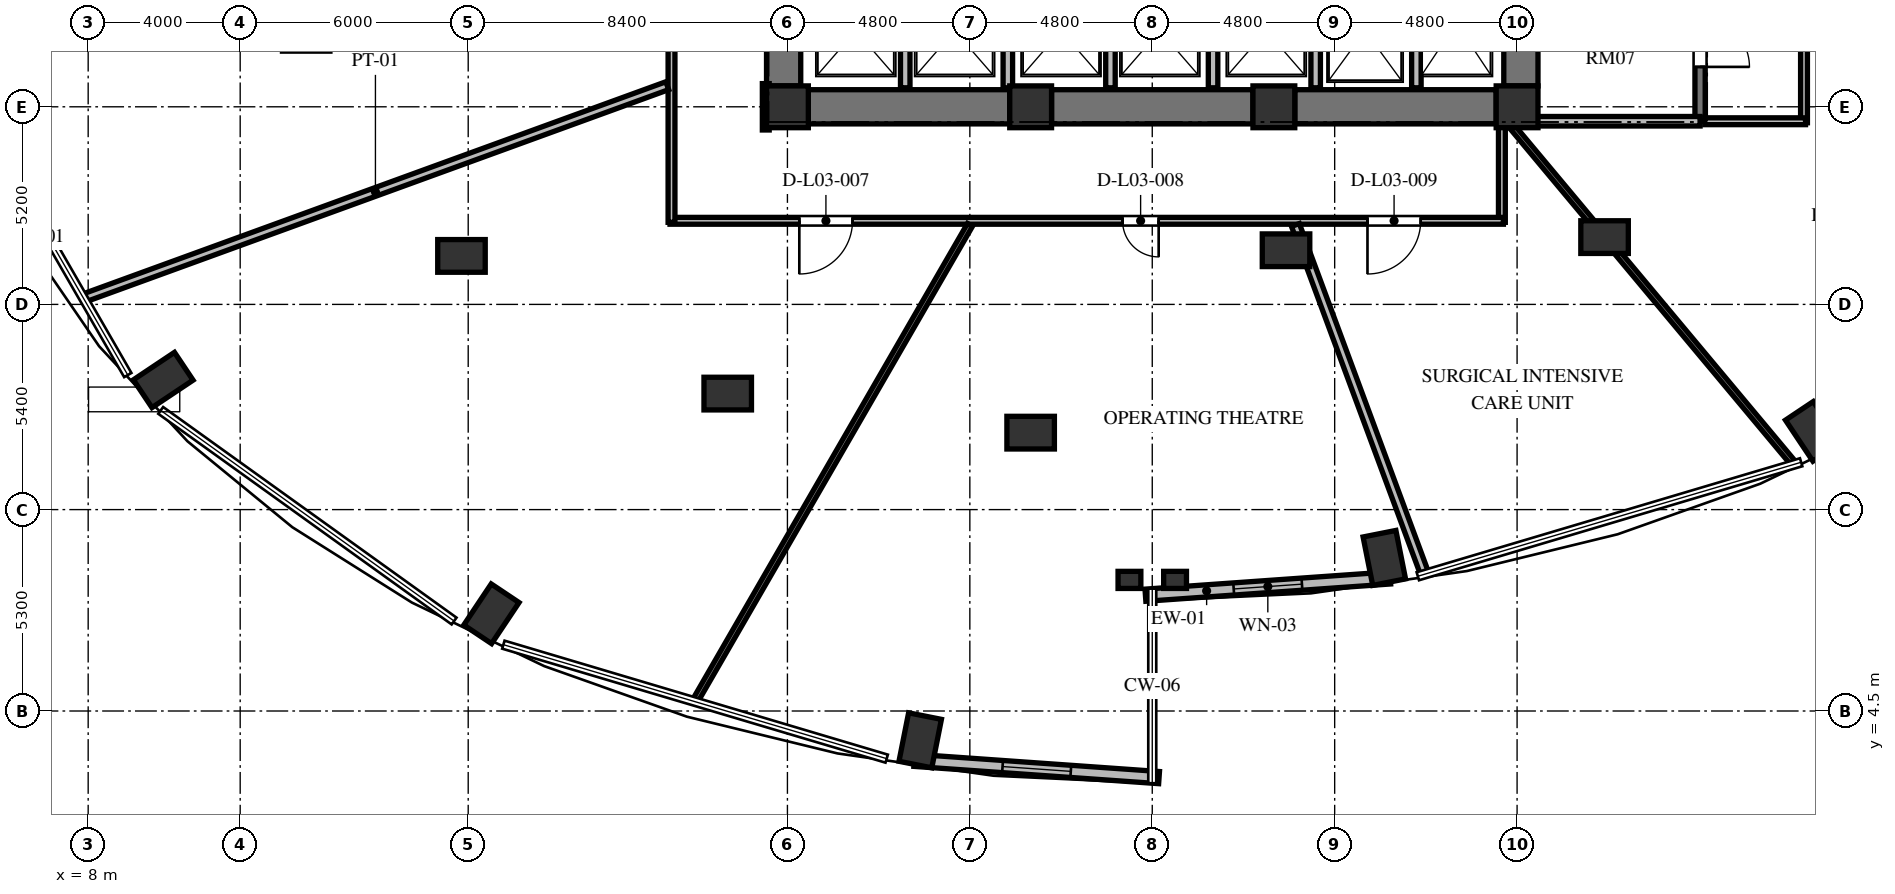
"""IFC4 building model, lengths in metres.
Left out: names, types, materials, properties, quantities, classifications, styles, units other than length and angle.
Written with IfcOpenShell. Run it as: python <this file> out.ifc"""

import sys

from ifc_helpers import new_model, si_unit, direction, frame, frame_2d, origin, origin_2d, place, context, subcontext, project, spatial, rectangle, extrude, element, fill, save


model = new_model("IFC4")
c1 = context("Model", 3, precision=1e-05, world=origin(), true_north=direction((0.0, 1.0)))
c2 = subcontext(c1, "Body", "Model", "MODEL_VIEW")
j1 = project(units=[si_unit("LENGTHUNIT", "METRE"), si_unit("PLANEANGLEUNIT", "RADIAN")], contexts=[c1])
p1 = place(None, origin())
s1 = spatial("IfcSite", under=j1, at=p1, CompositionType="ELEMENT")
p2 = place(p1, origin())
s2 = spatial("IfcBuilding", under=s1, at=p2, CompositionType="ELEMENT")
p3 = place(p2, frame((0.0, 0.0, 15.6)))
s3 = spatial("IfcBuildingStorey", under=s2, at=p3, CompositionType="ELEMENT", Elevation=15.6)
for number, where, z_axis, x_axis in (
    (1, (42.106, 8.529, 0.0), (0.0, 0.0, 1.0), (0.195, -0.981, 0.0)),
    (2, (53.389, 11.858, 0.0), (0.0, 0.0, 1.0), (0.556, -0.831, 0.0)),
    (3, (9.975, 13.211, 0.0), (0.0, 0.0, 1.0), (-0.831, -0.556, 0.0)),
    (4, (18.611, 7.058, 0.0), (0.0, 0.0, 1.0), (-0.556, -0.831, 0.0)),
    (5, (29.894, 3.729, 0.0), (0.0, 0.0, 1.0), (-0.195, -0.981, 0.0)),
):
    element("IfcColumn", number, at=place(p3, frame(where, z_axis=z_axis, x_axis=x_axis)), inside=s3, PredefinedType="COLUMN", context=c2, shape_type="SweptSolid", body=[
        extrude(rectangle(XDim=1.3, YDim=0.88, at=origin_2d()), origin(), (0.0, 0.0, 1.0), 4.8),
    ])
for number, where, z_axis, x_axis in (
    (6, (26.4, 20.4, 0.0), (0.0, 0.0, 1.0), (1.0, 0.0, 0.0)),
    (7, (32.8, 20.4, 0.0), (0.0, 0.0, 1.0), (1.0, 0.0, 0.0)),
    (8, (39.2, 20.4, 0.0), (0.0, 0.0, 1.0), (1.0, 0.0, 0.0)),
    (9, (45.6, 20.4, 0.0), (0.0, 0.0, 1.0), (1.0, 0.0, 0.0)),
):
    element("IfcColumn", number, at=place(p3, frame(where, z_axis=z_axis, x_axis=x_axis)), inside=s3, PredefinedType="COLUMN", context=c2, shape_type="SweptSolid", body=[
        extrude(rectangle(XDim=1.1, YDim=1.1, at=origin_2d()), origin(), (0.0, 0.0, 1.0), 4.8),
    ])
for number, where, z_axis, x_axis in (
    (10, (39.52, 16.625, 0.0), (0.0, 0.0, 1.0), (1.0, 0.0, 0.0)),
    (11, (47.902, 16.971, 0.0), (0.0, 0.0, 1.0), (1.0, 0.0, 0.0)),
    (12, (17.823, 16.476, 0.0), (0.0, 0.0, 1.0), (1.0, 0.0, 0.0)),
    (13, (24.829, 12.853, 0.0), (0.0, 0.0, 1.0), (1.0, 0.0, 0.0)),
    (14, (32.8, 11.825, 0.0), (0.0, 0.0, 1.0), (1.0, 0.0, 0.0)),
):
    element("IfcColumn", number, at=place(p3, frame(where, z_axis=z_axis, x_axis=x_axis)), inside=s3, PredefinedType="COLUMN", context=c2, shape_type="SweptSolid", body=[
        extrude(rectangle(XDim=1.25, YDim=0.86, at=origin_2d()), origin(), (0.0, 0.0, 1.0), 4.8),
    ])
for number, where, z_axis, x_axis in (
    (15, (35.4, 7.95, 0.0), (0.0, 0.0, 1.0), (1.0, 0.0, 0.0)),
    (16, (36.6, 7.95, 0.0), (0.0, 0.0, 1.0), (1.0, 0.0, 0.0)),
):
    element("IfcColumn", number, at=place(p3, frame(where, z_axis=z_axis, x_axis=x_axis)), inside=s3, PredefinedType="PILASTER", context=c2, shape_type="SweptSolid", body=[
        extrude(rectangle(XDim=0.6, YDim=0.45, at=origin_2d()), origin(), (0.0, 0.0, 1.0), 4.8),
    ])
p4 = place(p3, frame((26.3, 20.95, 0.0), z_axis=(0.0, 0.0, 1.0), x_axis=(0.0, 1.0, 0.0)))
e17 = element("IfcWall", 17, at=p4, inside=s3, PredefinedType="SHEAR", context=c2, shape_type="SweptSolid", body=[
    extrude(rectangle(XDim=14.1, YDim=0.9, at=frame_2d((7.05, 0.0))), origin(), (0.0, 0.0, 1.0), 4.8),
])
p5 = place(p4, frame((6.5, 0.0, 0.0)))
e18 = element("IfcOpeningElement", 18, at=p5, cuts=e17, PredefinedType="OPENING", context=c2, shape_type="SweptSolid", body=[
    extrude(rectangle(XDim=1.2, YDim=2.15, at=frame_2d((0.6, 1.075))), frame((0.0, 0.46, 0.0), z_axis=(0.0, -1.0, 0.0), x_axis=(1.0, 0.0, 0.0)), (0.0, 0.0, 1.0), 0.92),
])
p6 = place(p4, frame((9.6, 0.0, 0.0)))
e19 = element("IfcOpeningElement", 19, at=p6, cuts=e17, PredefinedType="OPENING", context=c2, shape_type="SweptSolid", body=[
    extrude(rectangle(XDim=1.3, YDim=2.2, at=frame_2d((0.65, 1.1))), frame((0.0, 0.46, 0.0), z_axis=(0.0, -1.0, 0.0), x_axis=(1.0, 0.0, 0.0)), (0.0, 0.0, 1.0), 0.92),
])
p7 = place(p4, frame((3.26, 0.0, 0.0)))
e20 = element("IfcOpeningElement", 20, at=p7, cuts=e17, PredefinedType="OPENING", context=c2, shape_type="SweptSolid", body=[
    extrude(rectangle(XDim=1.3, YDim=2.2, at=frame_2d((0.65, 1.1))), frame((0.0, 0.46, 0.0), z_axis=(0.0, -1.0, 0.0), x_axis=(1.0, 0.0, 0.0)), (0.0, 0.0, 1.0), 0.92),
])
p8 = place(p3, frame((45.7, 20.95, 0.0), z_axis=(0.0, 0.0, 1.0), x_axis=(0.0, 1.0, 0.0)))
e21 = element("IfcWall", 21, at=p8, inside=s3, PredefinedType="SHEAR", context=c2, shape_type="SweptSolid", body=[
    extrude(rectangle(XDim=14.1, YDim=0.9, at=frame_2d((7.05, 0.0))), origin(), (0.0, 0.0, 1.0), 4.8),
])
p9 = place(p8, frame((11.75, 0.0, 0.0)))
e22 = element("IfcOpeningElement", 22, at=p9, cuts=e21, PredefinedType="OPENING", context=c2, shape_type="SweptSolid", body=[
    extrude(rectangle(XDim=1.4, YDim=2.3, at=frame_2d((0.7, 1.15))), frame((0.0, 0.46, 0.0), z_axis=(0.0, -1.0, 0.0), x_axis=(1.0, 0.0, 0.0)), (0.0, 0.0, 1.0), 0.92),
])
p10 = place(p8, frame((0.95, 0.0, 0.0)))
e23 = element("IfcOpeningElement", 23, at=p10, cuts=e21, PredefinedType="OPENING", context=c2, shape_type="SweptSolid", body=[
    extrude(rectangle(XDim=1.4, YDim=2.3, at=frame_2d((0.7, 1.15))), frame((0.0, 0.46, 0.0), z_axis=(0.0, -1.0, 0.0), x_axis=(1.0, 0.0, 0.0)), (0.0, 0.0, 1.0), 0.92),
])
p11 = place(p3, frame((26.95, 20.4, 0.0), z_axis=(0.0, 0.0, 1.0), x_axis=(1.0, 0.0, 0.0)))
e24 = element("IfcWall", 24, at=p11, inside=s3, PredefinedType="SHEAR", context=c2, shape_type="SweptSolid", body=[
    extrude(rectangle(XDim=5.3, YDim=0.9, at=frame_2d((2.65, 0.0))), origin(), (0.0, 0.0, 1.0), 4.8),
])
p12 = place(p3, frame((33.35, 20.4, 0.0), z_axis=(0.0, 0.0, 1.0), x_axis=(1.0, 0.0, 0.0)))
e25 = element("IfcWall", 25, at=p12, inside=s3, PredefinedType="SHEAR", context=c2, shape_type="SweptSolid", body=[
    extrude(rectangle(XDim=5.3, YDim=0.9, at=frame_2d((2.65, 0.0))), origin(), (0.0, 0.0, 1.0), 4.8),
])
p13 = place(p3, frame((39.75, 20.4, 0.0), z_axis=(0.0, 0.0, 1.0), x_axis=(1.0, 0.0, 0.0)))
e26 = element("IfcWall", 26, at=p13, inside=s3, PredefinedType="SHEAR", context=c2, shape_type="SweptSolid", body=[
    extrude(rectangle(XDim=5.3, YDim=0.9, at=frame_2d((2.65, 0.0))), origin(), (0.0, 0.0, 1.0), 4.8),
])
p14 = place(p3, frame((35.82, 7.547, 0.0), z_axis=(0.0, 0.0, 1.0), x_axis=(0.99751367159, 0.070473221795, 0.0)))
e27 = element("IfcWall", 27, at=p14, inside=s3, PredefinedType="SOLIDWALL", context=c2, shape_type="SweptSolid", body=[
    extrude(rectangle(XDim=6.458, YDim=0.32, at=frame_2d((3.229, 0.0))), origin(), (0.0, 0.0, 1.0), 4.52),
])
p15 = place(p14, frame((2.329, 0.0, 0.85)))
e28 = element("IfcOpeningElement", 28, at=p15, cuts=e27, PredefinedType="OPENING", context=c2, shape_type="SweptSolid", body=[
    extrude(rectangle(XDim=1.8, YDim=2.4, at=frame_2d((0.9, 1.2))), frame((0.0, 0.17, 0.0), z_axis=(0.0, -1.0, 0.0), x_axis=(1.0, 0.0, 0.0)), (0.0, 0.0, 1.0), 0.34),
])
p16 = place(p3, frame((29.738, 3.202, 0.0), z_axis=(0.0, 0.0, 1.0), x_axis=(0.997513108184, -0.070481196075, 0.0)))
e29 = element("IfcWall", 29, at=p16, inside=s3, PredefinedType="SOLIDWALL", context=c2, shape_type="SweptSolid", body=[
    extrude(rectangle(XDim=6.457, YDim=0.32, at=frame_2d((3.229, 0.0))), origin(), (0.0, 0.0, 1.0), 4.52),
])
p17 = place(p16, frame((2.328, 0.0, 0.85)))
e30 = element("IfcOpeningElement", 30, at=p17, cuts=e29, PredefinedType="OPENING", context=c2, shape_type="SweptSolid", body=[
    extrude(rectangle(XDim=1.8, YDim=2.4, at=frame_2d((0.9, 1.2))), frame((0.0, 0.17, 0.0), z_axis=(0.0, -1.0, 0.0), x_axis=(1.0, 0.0, 0.0)), (0.0, 0.0, 1.0), 0.34),
])
p18 = place(p3, frame((42.95, 20.9, 0.0), z_axis=(0.0, 0.0, 1.0), x_axis=(0.0, 1.0, 0.0)))
e31 = element("IfcWall", 31, at=p18, inside=s3, PredefinedType="SOLIDWALL", context=c2, shape_type="SweptSolid", body=[
    extrude(rectangle(XDim=3.2, YDim=0.25, at=frame_2d((1.6, 0.0))), origin(), (0.0, 0.0, 1.0), 4.52),
])
for number, where, z_axis, x_axis in (
    (32, (29.5, 20.9, 0.0), (0.0, 0.0, 1.0), (0.0, 1.0, 0.0)),
    (33, (32.2, 20.9, 0.0), (0.0, 0.0, 1.0), (0.0, 1.0, 0.0)),
    (34, (34.9, 20.9, 0.0), (0.0, 0.0, 1.0), (0.0, 1.0, 0.0)),
    (35, (37.6, 20.9, 0.0), (0.0, 0.0, 1.0), (0.0, 1.0, 0.0)),
    (36, (40.3, 20.9, 0.0), (0.0, 0.0, 1.0), (0.0, 1.0, 0.0)),
):
    element("IfcWall", number, at=place(p3, frame(where, z_axis=z_axis, x_axis=x_axis)), inside=s3, PredefinedType="SOLIDWALL", context=c2, shape_type="SweptSolid", body=[
        extrude(rectangle(XDim=2.8, YDim=0.25, at=frame_2d((1.4, 0.0))), origin(), (0.0, 0.0, 1.0), 4.52),
    ])
p19 = place(p3, frame((50.415, 35.845, 0.0), z_axis=(0.0, 0.0, 1.0), x_axis=(0.0, -1.0, 0.0)))
e37 = element("IfcWall", 37, at=p19, inside=s3, PredefinedType="SHEAR", context=c2, shape_type="SweptSolid", body=[
    extrude(rectangle(XDim=15.825, YDim=0.27, at=frame_2d((7.913, 0.0))), origin(), (0.0, 0.0, 1.0), 4.8),
])
p20 = place(p19, frame((4.445, 0.0, 0.0)))
e38 = element("IfcOpeningElement", 38, at=p20, cuts=e37, PredefinedType="OPENING", context=c2, shape_type="SweptSolid", body=[
    extrude(rectangle(XDim=1.2, YDim=2.15, at=frame_2d((0.6, 1.075))), frame((0.0, 0.145, 0.0), z_axis=(0.0, -1.0, 0.0), x_axis=(1.0, 0.0, 0.0)), (0.0, 0.0, 1.0), 0.29),
])
p21 = place(p19, frame((1.295, 0.0, 0.0)))
e39 = element("IfcOpeningElement", 39, at=p21, cuts=e37, PredefinedType="OPENING", context=c2, shape_type="SweptSolid", body=[
    extrude(rectangle(XDim=1.3, YDim=2.2, at=frame_2d((0.65, 1.1))), frame((0.0, 0.145, 0.0), z_axis=(0.0, -1.0, 0.0), x_axis=(1.0, 0.0, 0.0)), (0.0, 0.0, 1.0), 0.29),
])
p22 = place(p19, frame((13.095, 0.0, 0.0)))
e40 = element("IfcOpeningElement", 40, at=p22, cuts=e37, PredefinedType="OPENING", context=c2, shape_type="SweptSolid", body=[
    extrude(rectangle(XDim=1.3, YDim=2.2, at=frame_2d((0.65, 1.1))), frame((0.0, 0.145, 0.0), z_axis=(0.0, -1.0, 0.0), x_axis=(1.0, 0.0, 0.0)), (0.0, 0.0, 1.0), 0.29),
])
p23 = place(p3, frame((45.7, 20.02, 0.0), z_axis=(0.0, 0.0, 1.0), x_axis=(1.0, 0.0, 0.0)))
e41 = element("IfcWall", 41, at=p23, inside=s3, PredefinedType="SOLIDWALL", context=c2, shape_type="SweptSolid", body=[
    extrude(rectangle(XDim=4.715, YDim=0.25, at=frame_2d((2.357, 0.0))), origin(), (0.0, 0.0, 1.0), 4.52),
])
p24 = place(p3, frame((53.15, 26.64, 0.0), z_axis=(0.0, 0.0, 1.0), x_axis=(0.0, -1.0, 0.0)))
e42 = element("IfcWall", 42, at=p24, inside=s3, PredefinedType="PARTITIONING", context=c2, shape_type="SweptSolid", body=[
    extrude(rectangle(XDim=6.66, YDim=0.18, at=frame_2d((3.33, 0.0))), origin(), (0.0, 0.0, 1.0), 4.52),
])
p25 = place(p24, frame((3.653, 0.0, 0.0)))
e43 = element("IfcOpeningElement", 43, at=p25, cuts=e42, PredefinedType="OPENING", context=c2, shape_type="SweptSolid", body=[
    extrude(rectangle(XDim=1.05, YDim=2.15, at=frame_2d((0.525, 1.075))), frame((0.0, 0.1, 0.0), z_axis=(0.0, -1.0, 0.0), x_axis=(1.0, 0.0, 0.0)), (0.0, 0.0, 1.0), 0.2),
])
p26 = place(p3, frame((53.19, 20.02, 0.0), z_axis=(0.0, 0.0, 1.0), x_axis=(-1.0, 0.0, 0.0)))
e44 = element("IfcWall", 44, at=p26, inside=s3, PredefinedType="PARTITIONING", context=c2, shape_type="SweptSolid", body=[
    extrude(rectangle(XDim=2.65, YDim=0.18, at=frame_2d((1.325, 0.0))), origin(), (0.0, 0.0, 1.0), 4.52),
])
p27 = place(p3, frame((25.83, 21.01, 0.0), z_axis=(0.0, 0.0, 1.0), x_axis=(0.0, -1.0, 0.0)))
e45 = element("IfcWall", 45, at=p27, inside=s3, PredefinedType="PARTITIONING", context=c2, shape_type="SweptSolid", body=[
    extrude(rectangle(XDim=1.22, YDim=0.18, at=frame_2d((0.61, 0.0))), origin(), (0.0, 0.0, 1.0), 4.52),
])
p28 = place(p3, frame((45.2, 19.91, 0.0), z_axis=(0.0, 0.0, 1.0), x_axis=(0.0, -1.0, 0.0)))
e46 = element("IfcWall", 46, at=p28, inside=s3, PredefinedType="PARTITIONING", context=c2, shape_type="SweptSolid", body=[
    extrude(rectangle(XDim=2.55, YDim=0.18, at=frame_2d((1.275, 0.0))), origin(), (0.0, 0.0, 1.0), 4.52),
])
p29 = place(p3, frame((45.24, 17.4, 0.0), z_axis=(0.0, 0.0, 1.0), x_axis=(-1.0, 0.0, 0.0)))
e47 = element("IfcWall", 47, at=p29, inside=s3, PredefinedType="PARTITIONING", context=c2, shape_type="SweptSolid", body=[
    extrude(rectangle(XDim=21.93, YDim=0.18, at=frame_2d((10.965, 0.0))), origin(), (0.0, 0.0, 1.0), 4.52),
])
p30 = place(p29, frame((17.127, 0.0, 0.0)))
e48 = element("IfcOpeningElement", 48, at=p30, cuts=e47, PredefinedType="OPENING", context=c2, shape_type="SweptSolid", body=[
    extrude(rectangle(XDim=1.4, YDim=2.2, at=frame_2d((0.7, 1.1))), frame((0.0, 0.1, 0.0), z_axis=(0.0, -1.0, 0.0), x_axis=(1.0, 0.0, 0.0)), (0.0, 0.0, 1.0), 0.2),
])
p31 = place(p29, frame((9.071, 0.0, 0.0)))
e49 = element("IfcOpeningElement", 49, at=p31, cuts=e47, PredefinedType="OPENING", context=c2, shape_type="SweptSolid", body=[
    extrude(rectangle(XDim=0.95, YDim=2.1, at=frame_2d((0.475, 1.05))), frame((0.0, 0.1, 0.0), z_axis=(0.0, -1.0, 0.0), x_axis=(1.0, 0.0, 0.0)), (0.0, 0.0, 1.0), 0.2),
])
p32 = place(p29, frame((2.177, 0.0, 0.0)))
e50 = element("IfcOpeningElement", 50, at=p32, cuts=e47, PredefinedType="OPENING", context=c2, shape_type="SweptSolid", body=[
    extrude(rectangle(XDim=1.4, YDim=2.2, at=frame_2d((0.7, 1.1))), frame((0.0, 0.1, 0.0), z_axis=(0.0, -1.0, 0.0), x_axis=(1.0, 0.0, 0.0)), (0.0, 0.0, 1.0), 0.2),
])
p33 = place(p3, frame((23.35, 17.36, 0.0), z_axis=(0.0, 0.0, 1.0), x_axis=(0.0, 1.0, 0.0)))
e51 = element("IfcWall", 51, at=p33, inside=s3, PredefinedType="PARTITIONING", context=c2, shape_type="SweptSolid", body=[
    extrude(rectangle(XDim=9.28, YDim=0.18, at=frame_2d((4.64, 0.0))), origin(), (0.0, 0.0, 1.0), 4.52),
])
p34 = place(p3, frame((39.767, 17.29, 0.0), z_axis=(0.0, 0.0, 1.0), x_axis=(0.347365452064, -0.937729834607, 0.0)))
e52 = element("IfcWall", 52, at=p34, inside=s3, PredefinedType="PARTITIONING", context=c2, shape_type="SweptSolid", body=[
    extrude(rectangle(XDim=9.804, YDim=0.22, at=frame_2d((4.902, 0.0))), origin(), (0.0, 0.0, 1.0), 4.52),
])
p35 = place(p3, frame((45.407, 19.95, 0.0), z_axis=(0.0, 0.0, 1.0), x_axis=(0.641117276754, -0.767442921296, 0.0)))
e53 = element("IfcWall", 53, at=p35, inside=s3, PredefinedType="PARTITIONING", context=c2, shape_type="SweptSolid", body=[
    extrude(rectangle(XDim=11.681, YDim=0.15, at=frame_2d((5.84, 0.0))), origin(), (0.0, 0.0, 1.0), 3.805),
])
p36 = place(p3, frame((53.26, 23.426, 0.0), z_axis=(0.0, 0.0, 1.0), x_axis=(0.927183900085, -0.374606480754, 0.0)))
e54 = element("IfcWall", 54, at=p36, inside=s3, PredefinedType="PARTITIONING", context=c2, shape_type="SweptSolid", body=[
    extrude(rectangle(XDim=11.145, YDim=0.15, at=frame_2d((5.572, 0.0))), origin(), (0.0, 0.0, 1.0), 4.52),
])
p37 = place(p3, frame((23.239, 20.955, 0.0), z_axis=(0.0, 0.0, 1.0), x_axis=(-0.939696131956, -0.342010496311, 0.0)))
e55 = element("IfcWall", 55, at=p37, inside=s3, PredefinedType="PARTITIONING", context=c2, shape_type="SweptSolid", body=[
    extrude(rectangle(XDim=16.345, YDim=0.22, at=frame_2d((8.172, 0.0))), origin(), (0.0, 0.0, 1.0), 4.52),
])
p38 = place(p3, frame((31.204, 17.293, 0.0), z_axis=(0.0, 0.0, 1.0), x_axis=(-0.500008108359, -0.866020722371, 0.0)))
e56 = element("IfcWall", 56, at=p38, inside=s3, PredefinedType="PARTITIONING", context=c2, shape_type="SweptSolid", body=[
    extrude(rectangle(XDim=14.476, YDim=0.15, at=frame_2d((7.238, 0.0))), origin(), (0.0, 0.0, 1.0), 4.52),
])
p39 = place(p15, origin())
e57 = element("IfcWindow", 57, at=p39, inside=s3, PartitioningType="SINGLE_PANEL", PredefinedType="WINDOW", context=c2, shape_type="SweptSolid", body=[
    extrude(rectangle(XDim=1.8, YDim=2.4, at=frame_2d((0.9, 1.2))), frame((0.0, 0.03, 0.0), z_axis=(0.0, -1.0, 0.0), x_axis=(1.0, 0.0, 0.0)), (0.0, 0.0, 1.0), 0.06),
])
fill(e28, e57)
p40 = place(p17, origin())
e58 = element("IfcWindow", 58, at=p40, inside=s3, PartitioningType="SINGLE_PANEL", PredefinedType="WINDOW", context=c2, shape_type="SweptSolid", body=[
    extrude(rectangle(XDim=1.8, YDim=2.4, at=frame_2d((0.9, 1.2))), frame((0.0, 0.03, 0.0), z_axis=(0.0, -1.0, 0.0), x_axis=(1.0, 0.0, 0.0)), (0.0, 0.0, 1.0), 0.06),
])
fill(e30, e58)
p41 = place(p22, origin())
e59 = element("IfcDoor", 59, at=p41, inside=s3, OperationType="SINGLE_SWING_RIGHT", PredefinedType="DOOR", context=c2, shape_type="SweptSolid", body=[
    extrude(rectangle(XDim=1.3, YDim=2.2, at=frame_2d((0.65, 1.1))), frame((0.0, 0.025, 0.0), z_axis=(0.0, -1.0, 0.0), x_axis=(1.0, 0.0, 0.0)), (0.0, 0.0, 1.0), 0.05),
])
fill(e40, e59)
p42 = place(p30, origin())
e60 = element("IfcDoor", 60, at=p42, inside=s3, OperationType="SINGLE_SWING_RIGHT", PredefinedType="DOOR", context=c2, shape_type="SweptSolid", body=[
    extrude(rectangle(XDim=1.4, YDim=2.2, at=frame_2d((0.7, 1.1))), frame((0.0, 0.025, 0.0), z_axis=(0.0, -1.0, 0.0), x_axis=(1.0, 0.0, 0.0)), (0.0, 0.0, 1.0), 0.05),
])
fill(e48, e60)
p43 = place(p31, origin())
e61 = element("IfcDoor", 61, at=p43, inside=s3, OperationType="SINGLE_SWING_LEFT", PredefinedType="DOOR", context=c2, shape_type="SweptSolid", body=[
    extrude(rectangle(XDim=0.95, YDim=2.1, at=frame_2d((0.475, 1.05))), frame((0.0, 0.025, 0.0), z_axis=(0.0, -1.0, 0.0), x_axis=(1.0, 0.0, 0.0)), (0.0, 0.0, 1.0), 0.05),
])
fill(e49, e61)
p44 = place(p32, origin())
e62 = element("IfcDoor", 62, at=p44, inside=s3, OperationType="SINGLE_SWING_RIGHT", PredefinedType="DOOR", context=c2, shape_type="SweptSolid", body=[
    extrude(rectangle(XDim=1.4, YDim=2.2, at=frame_2d((0.7, 1.1))), frame((0.0, 0.025, 0.0), z_axis=(0.0, -1.0, 0.0), x_axis=(1.0, 0.0, 0.0)), (0.0, 0.0, 1.0), 0.05),
])
fill(e50, e62)
save(model, sys.argv[1])
